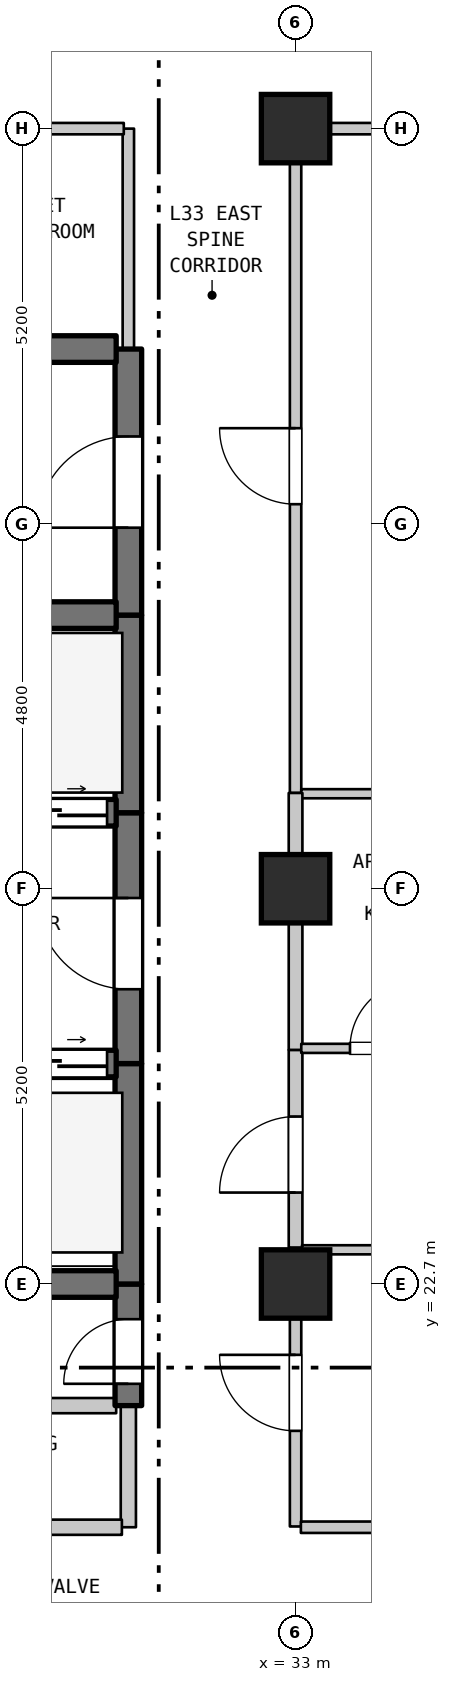
"""IFC4 building model, lengths in metres.
Left out: names, types, materials, properties, quantities, classifications, styles, units other than length and angle.
Written with IfcOpenShell. Run it as: python <this file> out.ifc"""

import sys

from ifc_helpers import new_model, si_unit, direction, frame, frame_2d, origin, origin_2d, place, context, subcontext, project, spatial, rectangle, extrude, element, fill, save


model = new_model("IFC4")
c1 = context("Model", 3, precision=1e-05, world=origin(), true_north=direction((0.0, 1.0)))
c2 = subcontext(c1, "Body", "Model", "MODEL_VIEW")
j1 = project(units=[si_unit("LENGTHUNIT", "METRE"), si_unit("PLANEANGLEUNIT", "RADIAN")], contexts=[c1])
p1 = place(None, origin())
s1 = spatial("IfcSite", under=j1, at=p1, CompositionType="ELEMENT")
p2 = place(p1, origin())
s2 = spatial("IfcBuilding", under=s1, at=p2, CompositionType="ELEMENT")
p3 = place(p2, frame((0.0, 0.0, 137.2)))
s3 = spatial("IfcBuildingStorey", under=s2, at=p3, CompositionType="ELEMENT", Elevation=137.2)
for number, where, z_axis, x_axis in (
    (1, (33.0, 22.7, 0.0), (0.0, 0.0, 1.0), (1.0, 0.0, 0.0)),
    (2, (33.0, 27.9, 0.0), (0.0, 0.0, 1.0), (1.0, 0.0, 0.0)),
    (3, (33.0, 37.9, 0.0), (0.0, 0.0, 1.0), (1.0, 0.0, 0.0)),
):
    element("IfcColumn", number, at=place(p3, frame(where, z_axis=z_axis, x_axis=x_axis)), inside=s3, PredefinedType="COLUMN", context=c2, shape_type="SweptSolid", body=[
        extrude(rectangle(XDim=0.9, YDim=0.9, at=origin_2d()), origin(), (0.0, 0.0, 1.0), 3.7),
    ])
p4 = place(p3, frame((30.8, 19.5, 0.0), z_axis=(0.0, 0.0, 1.0), x_axis=(0.0, 1.0, 0.0)))
e4 = element("IfcWall", 4, at=p4, inside=s3, PredefinedType="STANDARD", context=c2, shape_type="SweptSolid", body=[
    extrude(rectangle(XDim=1.6, YDim=0.2, at=frame_2d((0.8, 0.0))), origin(), (0.0, 0.0, 1.0), 3.385),
])
p5 = place(p3, frame((30.8, 21.1, 0.0), z_axis=(0.0, 0.0, 1.0), x_axis=(0.0, 1.0, 0.0)))
e5 = element("IfcWall", 5, at=p5, inside=s3, PredefinedType="SHEAR", context=c2, shape_type="SweptSolid", body=[
    extrude(rectangle(XDim=1.6, YDim=0.35, at=frame_2d((0.8, 0.0))), origin(), (0.0, 0.0, 1.0), 3.385),
])
p6 = place(p5, frame((0.287, 0.0, 0.0)))
e6 = element("IfcOpeningElement", 6, at=p6, cuts=e5, PredefinedType="OPENING", context=c2, shape_type="SweptSolid", body=[
    extrude(rectangle(XDim=0.85, YDim=2.1, at=frame_2d((0.425, 1.05))), frame((0.0, 0.185, 0.0), z_axis=(0.0, -1.0, 0.0), x_axis=(1.0, 0.0, 0.0)), (0.0, 0.0, 1.0), 0.37),
])
p7 = place(p3, frame((30.8, 22.7, 0.0), z_axis=(0.0, 0.0, 1.0), x_axis=(0.0, 1.0, 0.0)))
e7 = element("IfcWall", 7, at=p7, inside=s3, PredefinedType="SHEAR", context=c2, shape_type="SweptSolid", body=[
    extrude(rectangle(XDim=2.9, YDim=0.35, at=frame_2d((1.45, 0.0))), origin(), (0.0, 0.0, 1.0), 3.385),
])
p8 = place(p3, frame((30.8, 25.6, 0.0), z_axis=(0.0, 0.0, 1.0), x_axis=(0.0, 1.0, 0.0)))
e8 = element("IfcWall", 8, at=p8, inside=s3, PredefinedType="SHEAR", context=c2, shape_type="SweptSolid", body=[
    extrude(rectangle(XDim=3.3, YDim=0.35, at=frame_2d((1.65, 0.0))), origin(), (0.0, 0.0, 1.0), 3.385),
])
p9 = place(p8, frame((0.978, 0.0, 0.0)))
e9 = element("IfcOpeningElement", 9, at=p9, cuts=e8, PredefinedType="OPENING", context=c2, shape_type="SweptSolid", body=[
    extrude(rectangle(XDim=1.2, YDim=2.2, at=frame_2d((0.6, 1.1))), frame((0.0, 0.185, 0.0), z_axis=(0.0, -1.0, 0.0), x_axis=(1.0, 0.0, 0.0)), (0.0, 0.0, 1.0), 0.37),
])
p10 = place(p3, frame((30.8, 28.9, 0.0), z_axis=(0.0, 0.0, 1.0), x_axis=(0.0, 1.0, 0.0)))
e10 = element("IfcWall", 10, at=p10, inside=s3, PredefinedType="SHEAR", context=c2, shape_type="SweptSolid", body=[
    extrude(rectangle(XDim=2.6, YDim=0.35, at=frame_2d((1.3, 0.0))), origin(), (0.0, 0.0, 1.0), 3.385),
])
p11 = place(p3, frame((30.8, 31.5, 0.0), z_axis=(0.0, 0.0, 1.0), x_axis=(0.0, 1.0, 0.0)))
e11 = element("IfcWall", 11, at=p11, inside=s3, PredefinedType="SHEAR", context=c2, shape_type="SweptSolid", body=[
    extrude(rectangle(XDim=3.5, YDim=0.35, at=frame_2d((1.75, 0.0))), origin(), (0.0, 0.0, 1.0), 3.385),
])
p12 = place(p11, frame((1.15, 0.0, 0.0)))
e12 = element("IfcOpeningElement", 12, at=p12, cuts=e11, PredefinedType="OPENING", context=c2, shape_type="SweptSolid", body=[
    extrude(rectangle(XDim=1.2, YDim=2.2, at=frame_2d((0.6, 1.1))), frame((0.0, 0.185, 0.0), z_axis=(0.0, -1.0, 0.0), x_axis=(1.0, 0.0, 0.0)), (0.0, 0.0, 1.0), 0.37),
])
p13 = place(p3, frame((30.8, 35.0, 0.0), z_axis=(0.0, 0.0, 1.0), x_axis=(0.0, 1.0, 0.0)))
e13 = element("IfcWall", 13, at=p13, inside=s3, PredefinedType="STANDARD", context=c2, shape_type="SweptSolid", body=[
    extrude(rectangle(XDim=2.9, YDim=0.15, at=frame_2d((1.45, 0.0))), origin(), (0.0, 0.0, 1.0), 3.385),
])
p14 = place(p3, frame((33.0, 19.51, 0.0), z_axis=(0.0, 0.0, 1.0), x_axis=(0.0, 1.0, 0.0)))
e14 = element("IfcWall", 14, at=p14, inside=s3, PredefinedType="STANDARD", context=c2, shape_type="SweptSolid", body=[
    extrude(rectangle(XDim=3.66, YDim=0.15, at=frame_2d((1.83, 0.0))), origin(), (0.0, 0.0, 1.0), 2.935),
])
p15 = place(p14, frame((1.258, 0.0, 0.0)))
e15 = element("IfcOpeningElement", 15, at=p15, cuts=e14, PredefinedType="OPENING", context=c2, shape_type="SweptSolid", body=[
    extrude(rectangle(XDim=1.0, YDim=2.15, at=frame_2d((0.5, 1.075))), frame((0.0, 0.085, 0.0), z_axis=(0.0, -1.0, 0.0), x_axis=(1.0, 0.0, 0.0)), (0.0, 0.0, 1.0), 0.17),
])
p16 = place(p3, frame((33.0, 23.18, 0.0), z_axis=(0.0, 0.0, 1.0), x_axis=(0.0, 1.0, 0.0)))
e16 = element("IfcWall", 16, at=p16, inside=s3, PredefinedType="STANDARD", context=c2, shape_type="SweptSolid", body=[
    extrude(rectangle(XDim=2.6, YDim=0.18, at=frame_2d((1.3, 0.0))), origin(), (0.0, 0.0, 1.0), 2.935),
])
p17 = place(p16, frame((0.723, 0.0, 0.0)))
e17 = element("IfcOpeningElement", 17, at=p17, cuts=e16, PredefinedType="OPENING", context=c2, shape_type="SweptSolid", body=[
    extrude(rectangle(XDim=1.0, YDim=2.15, at=frame_2d((0.5, 1.075))), frame((0.0, 0.1, 0.0), z_axis=(0.0, -1.0, 0.0), x_axis=(1.0, 0.0, 0.0)), (0.0, 0.0, 1.0), 0.2),
])
p18 = place(p3, frame((33.0, 25.78, 0.0), z_axis=(0.0, 0.0, 1.0), x_axis=(0.0, 1.0, 0.0)))
e18 = element("IfcWall", 18, at=p18, inside=s3, PredefinedType="STANDARD", context=c2, shape_type="SweptSolid", body=[
    extrude(rectangle(XDim=2.12, YDim=0.18, at=frame_2d((1.06, 0.0))), origin(), (0.0, 0.0, 1.0), 2.935),
])
p19 = place(p3, frame((33.0, 29.16, 0.0), z_axis=(0.0, 0.0, 1.0), x_axis=(0.0, 1.0, 0.0)))
e19 = element("IfcWall", 19, at=p19, inside=s3, PredefinedType="STANDARD", context=c2, shape_type="SweptSolid", body=[
    extrude(rectangle(XDim=8.74, YDim=0.15, at=frame_2d((4.37, 0.0))), origin(), (0.0, 0.0, 1.0), 2.885),
])
p20 = place(p19, frame((3.799, 0.0, 0.0)))
e20 = element("IfcOpeningElement", 20, at=p20, cuts=e19, PredefinedType="OPENING", context=c2, shape_type="SweptSolid", body=[
    extrude(rectangle(XDim=1.0, YDim=2.15, at=frame_2d((0.5, 1.075))), frame((0.0, 0.085, 0.0), z_axis=(0.0, -1.0, 0.0), x_axis=(1.0, 0.0, 0.0)), (0.0, 0.0, 1.0), 0.17),
])
p21 = place(p3, frame((27.285, 19.5, 0.0), z_axis=(0.0, 0.0, 1.0), x_axis=(1.0, 0.0, 0.0)))
e21 = element("IfcWall", 21, at=p21, inside=s3, PredefinedType="STANDARD", context=c2, shape_type="SweptSolid", body=[
    extrude(rectangle(XDim=3.43, YDim=0.2, at=frame_2d((1.715, 0.0))), origin(), (0.0, 0.0, 1.0), 3.385),
])
p22 = place(p21, frame((1.192, 0.0, 0.0)))
e22 = element("IfcOpeningElement", 22, at=p22, cuts=e21, PredefinedType="OPENING", context=c2, shape_type="SweptSolid", body=[
    extrude(rectangle(XDim=0.9, YDim=2.15, at=frame_2d((0.45, 1.075))), frame((0.0, 0.11, 0.0), z_axis=(0.0, -1.0, 0.0), x_axis=(1.0, 0.0, 0.0)), (0.0, 0.0, 1.0), 0.22),
])
p23 = place(p3, frame((33.07, 19.5, 0.0), z_axis=(0.0, 0.0, 1.0), x_axis=(1.0, 0.0, 0.0)))
e23 = element("IfcWall", 23, at=p23, inside=s3, PredefinedType="STANDARD", context=c2, shape_type="SweptSolid", body=[
    extrude(rectangle(XDim=21.51, YDim=0.15, at=frame_2d((10.755, 0.0))), origin(), (0.0, 0.0, 1.0), 3.385),
])
p24 = place(p23, frame((10.185, 0.0, 0.0)))
e24 = element("IfcOpeningElement", 24, at=p24, cuts=e23, PredefinedType="OPENING", context=c2, shape_type="SweptSolid", body=[
    extrude(rectangle(XDim=1.0, YDim=2.15, at=frame_2d((0.5, 1.075))), frame((0.0, 0.085, 0.0), z_axis=(0.0, -1.0, 0.0), x_axis=(1.0, 0.0, 0.0)), (0.0, 0.0, 1.0), 0.17),
])
p25 = place(p3, frame((27.285, 21.1, 0.0), z_axis=(0.0, 0.0, 1.0), x_axis=(1.0, 0.0, 0.0)))
e25 = element("IfcWall", 25, at=p25, inside=s3, PredefinedType="STANDARD", context=c2, shape_type="SweptSolid", body=[
    extrude(rectangle(XDim=3.355, YDim=0.2, at=frame_2d((1.677, 0.0))), origin(), (0.0, 0.0, 1.0), 3.385),
])
p26 = place(p3, frame((27.46, 22.7, 0.0), z_axis=(0.0, 0.0, 1.0), x_axis=(1.0, 0.0, 0.0)))
e26 = element("IfcWall", 26, at=p26, inside=s3, PredefinedType="SHEAR", context=c2, shape_type="SweptSolid", body=[
    extrude(rectangle(XDim=3.18, YDim=0.35, at=frame_2d((1.59, 0.0))), origin(), (0.0, 0.0, 1.0), 3.385),
])
p27 = place(p3, frame((33.085, 23.15, 0.0), z_axis=(0.0, 0.0, 1.0), x_axis=(1.0, 0.0, 0.0)))
e27 = element("IfcWall", 27, at=p27, inside=s3, PredefinedType="PARTITIONING", context=c2, shape_type="SweptSolid", body=[
    extrude(rectangle(XDim=23.905, YDim=0.12, at=frame_2d((11.953, 0.0))), origin(), (0.0, 0.0, 1.0), 3.385),
])
p28 = place(p3, frame((27.46, 25.6, 0.0), z_axis=(0.0, 0.0, 1.0), x_axis=(1.0, 0.0, 0.0)))
e28 = element("IfcWall", 28, at=p28, inside=s3, PredefinedType="SHEAR", context=c2, shape_type="SweptSolid", body=[
    extrude(rectangle(XDim=3.18, YDim=0.35, at=frame_2d((1.59, 0.0))), origin(), (0.0, 0.0, 1.0), 3.385),
])
p29 = place(p28, frame((0.12, 0.0, 0.0)))
e29 = element("IfcOpeningElement", 29, at=p29, cuts=e28, PredefinedType="OPENING", context=c2, shape_type="SweptSolid", body=[
    extrude(rectangle(XDim=1.25, YDim=2.2, at=frame_2d((0.625, 1.1))), frame((0.0, 0.185, 0.0), z_axis=(0.0, -1.0, 0.0), x_axis=(1.0, 0.0, 0.0)), (0.0, 0.0, 1.0), 0.37),
])
p30 = place(p28, frame((1.81, 0.0, 0.0)))
e30 = element("IfcOpeningElement", 30, at=p30, cuts=e28, PredefinedType="OPENING", context=c2, shape_type="SweptSolid", body=[
    extrude(rectangle(XDim=1.25, YDim=2.2, at=frame_2d((0.625, 1.1))), frame((0.0, 0.185, 0.0), z_axis=(0.0, -1.0, 0.0), x_axis=(1.0, 0.0, 0.0)), (0.0, 0.0, 1.0), 0.37),
])
p31 = place(p3, frame((33.075, 25.8, 0.0), z_axis=(0.0, 0.0, 1.0), x_axis=(1.0, 0.0, 0.0)))
e31 = element("IfcWall", 31, at=p31, inside=s3, PredefinedType="PARTITIONING", context=c2, shape_type="SweptSolid", body=[
    extrude(rectangle(XDim=2.364, YDim=0.12, at=frame_2d((1.182, 0.0))), origin(), (0.0, 0.0, 1.0), 3.385),
])
p32 = place(p31, frame((0.641, 0.0, 0.0)))
e32 = element("IfcOpeningElement", 32, at=p32, cuts=e31, PredefinedType="OPENING", context=c2, shape_type="SweptSolid", body=[
    extrude(rectangle(XDim=0.9, YDim=2.15, at=frame_2d((0.45, 1.075))), frame((0.0, 0.07, 0.0), z_axis=(0.0, -1.0, 0.0), x_axis=(1.0, 0.0, 0.0)), (0.0, 0.0, 1.0), 0.14),
])
p33 = place(p3, frame((27.46, 28.9, 0.0), z_axis=(0.0, 0.0, 1.0), x_axis=(1.0, 0.0, 0.0)))
e33 = element("IfcWall", 33, at=p33, inside=s3, PredefinedType="SHEAR", context=c2, shape_type="SweptSolid", body=[
    extrude(rectangle(XDim=3.18, YDim=0.35, at=frame_2d((1.59, 0.0))), origin(), (0.0, 0.0, 1.0), 3.385),
])
p34 = place(p33, frame((0.12, 0.0, 0.0)))
e34 = element("IfcOpeningElement", 34, at=p34, cuts=e33, PredefinedType="OPENING", context=c2, shape_type="SweptSolid", body=[
    extrude(rectangle(XDim=1.25, YDim=2.2, at=frame_2d((0.625, 1.1))), frame((0.0, 0.185, 0.0), z_axis=(0.0, -1.0, 0.0), x_axis=(1.0, 0.0, 0.0)), (0.0, 0.0, 1.0), 0.37),
])
p35 = place(p33, frame((1.81, 0.0, 0.0)))
e35 = element("IfcOpeningElement", 35, at=p35, cuts=e33, PredefinedType="OPENING", context=c2, shape_type="SweptSolid", body=[
    extrude(rectangle(XDim=1.25, YDim=2.2, at=frame_2d((0.625, 1.1))), frame((0.0, 0.185, 0.0), z_axis=(0.0, -1.0, 0.0), x_axis=(1.0, 0.0, 0.0)), (0.0, 0.0, 1.0), 0.37),
])
p36 = place(p3, frame((33.075, 29.15, 0.0), z_axis=(0.0, 0.0, 1.0), x_axis=(1.0, 0.0, 0.0)))
e36 = element("IfcWall", 36, at=p36, inside=s3, PredefinedType="PARTITIONING", context=c2, shape_type="SweptSolid", body=[
    extrude(rectangle(XDim=2.364, YDim=0.12, at=frame_2d((1.182, 0.0))), origin(), (0.0, 0.0, 1.0), 3.385),
])
p37 = place(p3, frame((27.46, 31.5, 0.0), z_axis=(0.0, 0.0, 1.0), x_axis=(1.0, 0.0, 0.0)))
e37 = element("IfcWall", 37, at=p37, inside=s3, PredefinedType="SHEAR", context=c2, shape_type="SweptSolid", body=[
    extrude(rectangle(XDim=3.18, YDim=0.35, at=frame_2d((1.59, 0.0))), origin(), (0.0, 0.0, 1.0), 3.385),
])
p38 = place(p3, frame((26.645, 35.0, 0.0), z_axis=(0.0, 0.0, 1.0), x_axis=(1.0, 0.0, 0.0)))
e38 = element("IfcWall", 38, at=p38, inside=s3, PredefinedType="SHEAR", context=c2, shape_type="SweptSolid", body=[
    extrude(rectangle(XDim=3.995, YDim=0.35, at=frame_2d((1.998, 0.0))), origin(), (0.0, 0.0, 1.0), 3.385),
])
p39 = place(p38, frame((1.508, 0.0, 0.0)))
e39 = element("IfcOpeningElement", 39, at=p39, cuts=e38, PredefinedType="OPENING", context=c2, shape_type="SweptSolid", body=[
    extrude(rectangle(XDim=0.95, YDim=2.15, at=frame_2d((0.475, 1.075))), frame((0.0, 0.185, 0.0), z_axis=(0.0, -1.0, 0.0), x_axis=(1.0, 0.0, 0.0)), (0.0, 0.0, 1.0), 0.37),
])
p40 = place(p3, frame((26.645, 37.9, 0.0), z_axis=(0.0, 0.0, 1.0), x_axis=(1.0, 0.0, 0.0)))
e40 = element("IfcWall", 40, at=p40, inside=s3, PredefinedType="STANDARD", context=c2, shape_type="SweptSolid", body=[
    extrude(rectangle(XDim=4.095, YDim=0.15, at=frame_2d((2.047, 0.0))), origin(), (0.0, 0.0, 1.0), 2.885),
])
p41 = place(p3, frame((33.06, 37.9, 0.0), z_axis=(0.0, 0.0, 1.0), x_axis=(1.0, 0.0, 0.0)))
e41 = element("IfcWall", 41, at=p41, inside=s3, PredefinedType="STANDARD", context=c2, shape_type="SweptSolid", body=[
    extrude(rectangle(XDim=11.879, YDim=0.15, at=frame_2d((5.939, 0.0))), origin(), (0.0, 0.0, 1.0), 3.385),
])
p42 = place(p41, frame((5.439, 0.0, 0.0)))
e42 = element("IfcOpeningElement", 42, at=p42, cuts=e41, PredefinedType="OPENING", context=c2, shape_type="SweptSolid", body=[
    extrude(rectangle(XDim=1.0, YDim=2.15, at=frame_2d((0.5, 1.075))), frame((0.0, 0.085, 0.0), z_axis=(0.0, -1.0, 0.0), x_axis=(1.0, 0.0, 0.0)), (0.0, 0.0, 1.0), 0.17),
])
p43 = place(p3, frame((33.0, 27.9, 0.0), z_axis=(0.0, 0.0, 1.0), x_axis=(0.0, 1.0, 0.0)))
e43 = element("IfcWall", 43, at=p43, inside=s3, PredefinedType="STANDARD", context=c2, shape_type="SweptSolid", body=[
    extrude(rectangle(XDim=1.26, YDim=0.18, at=frame_2d((0.63, 0.0))), origin(), (0.0, 0.0, 1.0), 2.885),
])
p44 = place(p6, origin())
e44 = element("IfcDoor", 44, at=p44, inside=s3, OperationType="SINGLE_SWING_LEFT", PredefinedType="DOOR", context=c2, shape_type="SweptSolid", body=[
    extrude(rectangle(XDim=0.85, YDim=2.1, at=frame_2d((0.425, 1.05))), frame((0.0, 0.025, 0.0), z_axis=(0.0, -1.0, 0.0), x_axis=(1.0, 0.0, 0.0)), (0.0, 0.0, 1.0), 0.05),
])
fill(e6, e44)
p45 = place(p9, origin())
e45 = element("IfcDoor", 45, at=p45, inside=s3, OperationType="SINGLE_SWING_RIGHT", PredefinedType="DOOR", context=c2, shape_type="SweptSolid", body=[
    extrude(rectangle(XDim=1.2, YDim=2.2, at=frame_2d((0.6, 1.1))), frame((0.0, 0.025, 0.0), z_axis=(0.0, -1.0, 0.0), x_axis=(1.0, 0.0, 0.0)), (0.0, 0.0, 1.0), 0.05),
])
fill(e9, e45)
p46 = place(p12, origin())
e46 = element("IfcDoor", 46, at=p46, inside=s3, OperationType="SINGLE_SWING_LEFT", PredefinedType="DOOR", context=c2, shape_type="SweptSolid", body=[
    extrude(rectangle(XDim=1.2, YDim=2.2, at=frame_2d((0.6, 1.1))), frame((0.0, 0.025, 0.0), z_axis=(0.0, -1.0, 0.0), x_axis=(1.0, 0.0, 0.0)), (0.0, 0.0, 1.0), 0.05),
])
fill(e12, e46)
p47 = place(p15, origin())
e47 = element("IfcDoor", 47, at=p47, inside=s3, OperationType="SINGLE_SWING_RIGHT", PredefinedType="DOOR", context=c2, shape_type="SweptSolid", body=[
    extrude(rectangle(XDim=1.0, YDim=2.15, at=frame_2d((0.5, 1.075))), frame((0.0, 0.025, 0.0), z_axis=(0.0, -1.0, 0.0), x_axis=(1.0, 0.0, 0.0)), (0.0, 0.0, 1.0), 0.05),
])
fill(e15, e47)
p48 = place(p17, origin())
e48 = element("IfcDoor", 48, at=p48, inside=s3, OperationType="SINGLE_SWING_LEFT", PredefinedType="DOOR", context=c2, shape_type="SweptSolid", body=[
    extrude(rectangle(XDim=1.0, YDim=2.15, at=frame_2d((0.5, 1.075))), frame((0.0, 0.025, 0.0), z_axis=(0.0, -1.0, 0.0), x_axis=(1.0, 0.0, 0.0)), (0.0, 0.0, 1.0), 0.05),
])
fill(e17, e48)
p49 = place(p20, origin())
e49 = element("IfcDoor", 49, at=p49, inside=s3, OperationType="SINGLE_SWING_RIGHT", PredefinedType="DOOR", context=c2, shape_type="SweptSolid", body=[
    extrude(rectangle(XDim=1.0, YDim=2.15, at=frame_2d((0.5, 1.075))), frame((0.0, 0.025, 0.0), z_axis=(0.0, -1.0, 0.0), x_axis=(1.0, 0.0, 0.0)), (0.0, 0.0, 1.0), 0.05),
])
fill(e20, e49)
p50 = place(p30, origin())
e50 = element("IfcDoor", 50, at=p50, inside=s3, OperationType="DOUBLE_DOOR_SLIDING", PredefinedType="DOOR", context=c2, shape_type="SweptSolid", body=[
    extrude(rectangle(XDim=1.25, YDim=2.2, at=frame_2d((0.625, 1.1))), frame((0.0, 0.025, 0.0), z_axis=(0.0, -1.0, 0.0), x_axis=(1.0, 0.0, 0.0)), (0.0, 0.0, 1.0), 0.05),
])
fill(e30, e50)
p51 = place(p32, origin())
e51 = element("IfcDoor", 51, at=p51, inside=s3, OperationType="SINGLE_SWING_RIGHT", PredefinedType="DOOR", context=c2, shape_type="SweptSolid", body=[
    extrude(rectangle(XDim=0.9, YDim=2.15, at=frame_2d((0.45, 1.075))), frame((0.0, 0.025, 0.0), z_axis=(0.0, -1.0, 0.0), x_axis=(1.0, 0.0, 0.0)), (0.0, 0.0, 1.0), 0.05),
])
fill(e32, e51)
p52 = place(p35, origin())
e52 = element("IfcDoor", 52, at=p52, inside=s3, OperationType="DOUBLE_DOOR_SLIDING", PredefinedType="DOOR", context=c2, shape_type="SweptSolid", body=[
    extrude(rectangle(XDim=1.25, YDim=2.2, at=frame_2d((0.625, 1.1))), frame((0.0, 0.025, 0.0), z_axis=(0.0, -1.0, 0.0), x_axis=(1.0, 0.0, 0.0)), (0.0, 0.0, 1.0), 0.05),
])
fill(e35, e52)
save(model, sys.argv[1])
